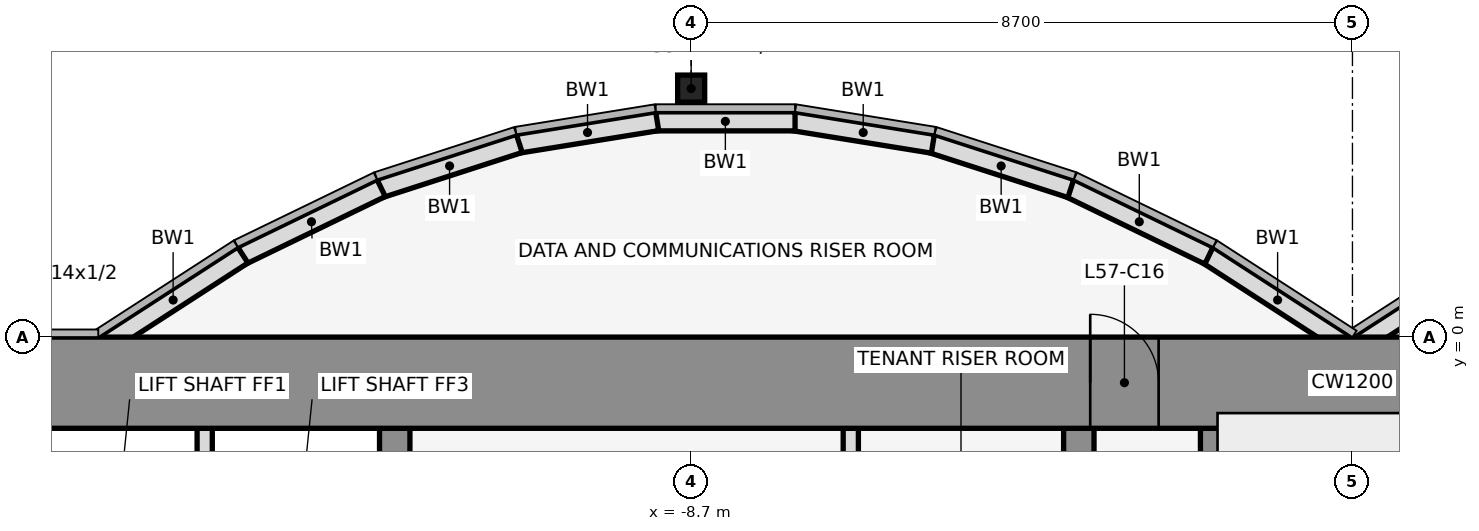
"""IFC4 building model, lengths in metres.
Left out: names, types, materials, properties, quantities, classifications, styles, units other than length and angle.
Written with IfcOpenShell. Run it as: python <this file> out.ifc"""

import sys

from ifc_helpers import new_model, si_unit, direction, frame, frame_2d, origin, origin_2d, place, context, subcontext, project, spatial, rectangle, hollow_rectangle, extrude, element, fill, save


model = new_model("IFC4")
c1 = context("Model", 3, precision=1e-05, world=origin(), true_north=direction((0.0, 1.0)))
c2 = subcontext(c1, "Body", "Model", "MODEL_VIEW")
j1 = project(units=[si_unit("LENGTHUNIT", "METRE"), si_unit("PLANEANGLEUNIT", "RADIAN")], contexts=[c1])
p1 = place(None, origin())
s1 = spatial("IfcSite", under=j1, at=p1, CompositionType="ELEMENT")
p2 = place(p1, origin())
s2 = spatial("IfcBuilding", under=s1, at=p2, CompositionType="ELEMENT")
p3 = place(p2, frame((0.0, 0.0, 254.0)))
s3 = spatial("IfcBuildingStorey", under=s2, at=p3, CompositionType="ELEMENT", Elevation=254.0)
p4 = place(p3, frame((-8.7, 3.269, 0.0), z_axis=(0.0, 0.0, 1.0), x_axis=(1.0, 0.0, 0.0)))
e1 = element("IfcColumn", 1, at=p4, inside=s3, PredefinedType="COLUMN", context=c2, shape_type="SweptSolid", body=[
    extrude(hollow_rectangle(XDim=0.356, YDim=0.356, WallThickness=0.012, at=origin_2d()), origin(), (0.0, 0.0, 1.0), 4.2),
])
for number, where, z_axis, x_axis in (
    (2, (1.901, 1.08, 0.0), (0.0, 0.0, 1.0), (-0.84, -0.543, 0.0)),
    (3, (-0.068, -0.105, 0.0), (0.0, 0.0, 1.0), (-0.84, 0.543, 0.0)),
):
    element("IfcWall", number, at=place(p3, frame(where, z_axis=z_axis, x_axis=x_axis)), inside=s3, PredefinedType="STANDARD", context=c2, shape_type="SweptSolid", body=[
        extrude(rectangle(XDim=2.183, YDim=0.25, at=frame_2d((1.091, 0.0))), origin(), (0.0, 0.0, 1.0), 4.05),
    ])
p5 = place(p3, frame((-1.888, 1.073, 0.0), z_axis=(0.0, 0.0, 1.0), x_axis=(-0.89982408427, 0.436252928206, 0.0)))
e4 = element("IfcWall", 4, at=p5, inside=s3, PredefinedType="STANDARD", context=c2, shape_type="SweptSolid", body=[
    extrude(rectangle(XDim=2.038, YDim=0.25, at=frame_2d((1.019, 0.0))), origin(), (0.0, 0.0, 1.0), 4.05),
])
p6 = place(p3, frame((-3.705, 1.955, 0.0), z_axis=(0.0, 0.0, 1.0), x_axis=(-0.951495806175, 0.307661714928, 0.0)))
e5 = element("IfcWall", 5, at=p6, inside=s3, PredefinedType="STANDARD", context=c2, shape_type="SweptSolid", body=[
    extrude(rectangle(XDim=1.927, YDim=0.25, at=frame_2d((0.963, 0.0))), origin(), (0.0, 0.0, 1.0), 4.05),
])
p7 = place(p3, frame((-5.52, 2.543, 0.0), z_axis=(0.0, 0.0, 1.0), x_axis=(-0.987181718931, 0.159600293885, 0.0)))
e6 = element("IfcWall", 6, at=p7, inside=s3, PredefinedType="STANDARD", context=c2, shape_type="SweptSolid", body=[
    extrude(rectangle(XDim=1.857, YDim=0.25, at=frame_2d((0.929, 0.0))), origin(), (0.0, 0.0, 1.0), 4.05),
])
p8 = place(p3, frame((-7.333, 2.838, 0.0), z_axis=(0.0, 0.0, 1.0), x_axis=(-1.0, 0.0, 0.0)))
e7 = element("IfcWall", 7, at=p8, inside=s3, PredefinedType="STANDARD", context=c2, shape_type="SweptSolid", body=[
    extrude(rectangle(XDim=1.833, YDim=0.25, at=frame_2d((0.917, 0.0))), origin(), (0.0, 0.0, 1.0), 4.05),
])
p9 = place(p3, frame((-9.147, 2.84, 0.0), z_axis=(0.0, 0.0, 1.0), x_axis=(-0.987181718931, -0.159600293885, 0.0)))
e8 = element("IfcWall", 8, at=p9, inside=s3, PredefinedType="STANDARD", context=c2, shape_type="SweptSolid", body=[
    extrude(rectangle(XDim=1.857, YDim=0.25, at=frame_2d((0.929, 0.0))), origin(), (0.0, 0.0, 1.0), 4.05),
])
p10 = place(p3, frame((-10.962, 2.548, 0.0), z_axis=(0.0, 0.0, 1.0), x_axis=(-0.951495806175, -0.307661714928, 0.0)))
e9 = element("IfcWall", 9, at=p10, inside=s3, PredefinedType="STANDARD", context=c2, shape_type="SweptSolid", body=[
    extrude(rectangle(XDim=1.927, YDim=0.25, at=frame_2d((0.963, 0.0))), origin(), (0.0, 0.0, 1.0), 4.05),
])
p11 = place(p3, frame((-12.779, 1.962, 0.0), z_axis=(0.0, 0.0, 1.0), x_axis=(-0.89982408427, -0.436252928206, 0.0)))
e10 = element("IfcWall", 10, at=p11, inside=s3, PredefinedType="STANDARD", context=c2, shape_type="SweptSolid", body=[
    extrude(rectangle(XDim=2.038, YDim=0.25, at=frame_2d((1.019, 0.0))), origin(), (0.0, 0.0, 1.0), 4.05),
])
p12 = place(p3, frame((-14.599, 1.08, 0.0), z_axis=(0.0, 0.0, 1.0), x_axis=(-0.83981312244, -0.542875602121, 0.0)))
e11 = element("IfcWall", 11, at=p12, inside=s3, PredefinedType="STANDARD", context=c2, shape_type="SweptSolid", body=[
    extrude(rectangle(XDim=2.183, YDim=0.25, at=frame_2d((1.091, 0.0))), origin(), (0.0, 0.0, 1.0), 4.05),
])
p13 = place(p3, frame((-15.1, -4.6, 0.0), z_axis=(0.0, 0.0, 1.0), x_axis=(0.0, 1.0, 0.0)))
e12 = element("IfcWall", 12, at=p13, inside=s3, PredefinedType="PARTITIONING", context=c2, shape_type="SweptSolid", body=[
    extrude(rectangle(XDim=3.4, YDim=0.2, at=frame_2d((1.7, 0.0))), origin(), (0.0, 0.0, 1.0), 3.118),
])
p14 = place(p3, frame((-12.6, -11.8, 0.0), z_axis=(0.0, 0.0, 1.0), x_axis=(0.0, 1.0, 0.0)))
e13 = element("IfcWall", 13, at=p14, inside=s3, PredefinedType="SHEAR", context=c2, shape_type="SweptSolid", body=[
    extrude(rectangle(XDim=10.6, YDim=0.4, at=frame_2d((5.3, 0.0))), origin(), (0.0, 0.0, 1.0), 4.2),
])
p15 = place(p14, frame((4.75, 0.0, 0.0)))
e14 = element("IfcOpeningElement", 14, at=p15, cuts=e13, PredefinedType="OPENING", context=c2, shape_type="SweptSolid", body=[
    extrude(rectangle(XDim=1.1, YDim=2.1, at=frame_2d((0.55, 1.05))), frame((0.0, 0.212, 0.0), z_axis=(0.0, -1.0, 0.0), x_axis=(1.0, 0.0, 0.0)), (0.0, 0.0, 1.0), 0.424),
])
p16 = place(p3, frame((-6.6, -4.6, 0.0), z_axis=(0.0, 0.0, 1.0), x_axis=(0.0, 1.0, 0.0)))
e15 = element("IfcWall", 15, at=p16, inside=s3, PredefinedType="PARTITIONING", context=c2, shape_type="SweptSolid", body=[
    extrude(rectangle(XDim=3.4, YDim=0.2, at=frame_2d((1.7, 0.0))), origin(), (0.0, 0.0, 1.0), 3.118),
])
p17 = place(p3, frame((-3.6, -11.8, 0.0), z_axis=(0.0, 0.0, 1.0), x_axis=(0.0, 1.0, 0.0)))
e16 = element("IfcWall", 16, at=p17, inside=s3, PredefinedType="SHEAR", context=c2, shape_type="SweptSolid", body=[
    extrude(rectangle(XDim=10.6, YDim=0.4, at=frame_2d((5.3, 0.0))), origin(), (0.0, 0.0, 1.0), 4.2),
])
p18 = place(p17, frame((4.85, 0.0, 0.0)))
e17 = element("IfcOpeningElement", 17, at=p18, cuts=e16, PredefinedType="OPENING", context=c2, shape_type="SweptSolid", body=[
    extrude(rectangle(XDim=0.9, YDim=2.1, at=frame_2d((0.45, 1.05))), frame((0.0, 0.212, 0.0), z_axis=(0.0, -1.0, 0.0), x_axis=(1.0, 0.0, 0.0)), (0.0, 0.0, 1.0), 0.424),
])
p19 = place(p3, frame((-1.8, -11.8, 0.0), z_axis=(0.0, 0.0, 1.0), x_axis=(0.0, 1.0, 0.0)))
e18 = element("IfcWall", 18, at=p19, inside=s3, PredefinedType="SHEAR", context=c2, shape_type="SweptSolid", body=[
    extrude(rectangle(XDim=10.6, YDim=0.4, at=frame_2d((5.3, 0.0))), origin(), (0.0, 0.0, 1.0), 4.2),
])
p20 = place(p3, frame((-22.0, -0.6, 0.0), z_axis=(0.0, 0.0, 1.0), x_axis=(1.0, 0.0, 0.0)))
e19 = element("IfcWall", 19, at=p20, inside=s3, PredefinedType="SHEAR", context=c2, shape_type="SweptSolid", body=[
    extrude(rectangle(XDim=44.0, YDim=1.2, at=frame_2d((22.0, 0.0))), origin(), (0.0, 0.0, 1.0), 4.2),
])
p21 = place(p20, frame((18.55, 0.0, 0.0)))
e20 = element("IfcOpeningElement", 20, at=p21, cuts=e19, PredefinedType="OPENING", context=c2, shape_type="SweptSolid", body=[
    extrude(rectangle(XDim=0.9, YDim=2.1, at=frame_2d((0.45, 1.05))), frame((0.0, 0.612, 0.0), z_axis=(0.0, -1.0, 0.0), x_axis=(1.0, 0.0, 0.0)), (0.0, 0.0, 1.0), 1.224),
])
p22 = place(p20, frame((24.55, 0.0, 0.0)))
e21 = element("IfcOpeningElement", 21, at=p22, cuts=e19, PredefinedType="OPENING", context=c2, shape_type="SweptSolid", body=[
    extrude(rectangle(XDim=0.9, YDim=2.1, at=frame_2d((0.45, 1.05))), frame((0.0, 0.612, 0.0), z_axis=(0.0, -1.0, 0.0), x_axis=(1.0, 0.0, 0.0)), (0.0, 0.0, 1.0), 1.224),
])
p23 = place(p21, origin())
e22 = element("IfcDoor", 22, at=p23, inside=s3, OperationType="SINGLE_SWING_LEFT", PredefinedType="DOOR", context=c2, shape_type="SweptSolid", body=[
    extrude(rectangle(XDim=0.9, YDim=2.1, at=frame_2d((0.45, 1.05))), frame((0.0, 0.025, 0.0), z_axis=(0.0, -1.0, 0.0), x_axis=(1.0, 0.0, 0.0)), (0.0, 0.0, 1.0), 0.05),
])
fill(e20, e22)
save(model, sys.argv[1])
